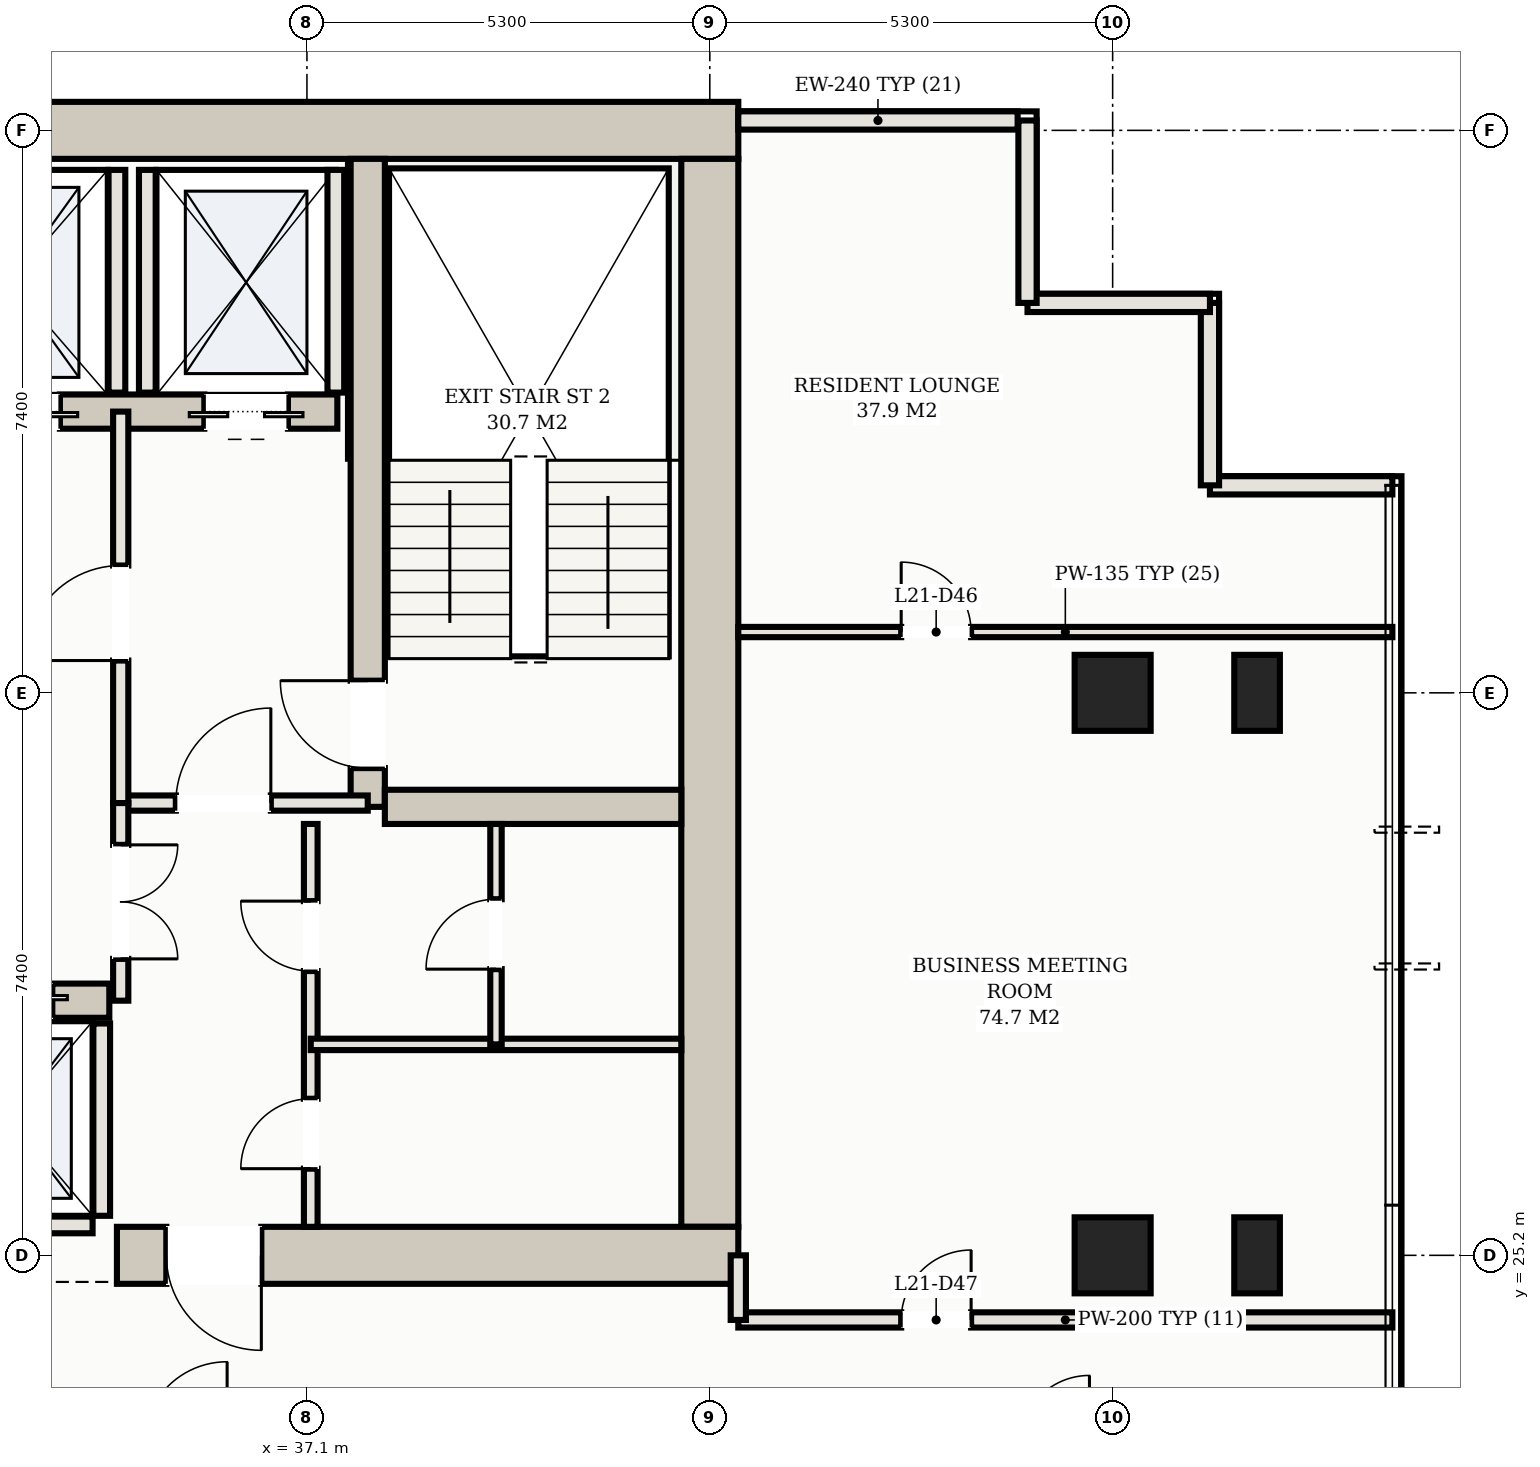
"""IFC4 building model, lengths in metres.
Left out: names, types, materials, properties, quantities, classifications, styles, units other than length and angle.
Written with IfcOpenShell. Run it as: python <this file> out.ifc"""

import sys

from ifc_helpers import new_model, si_unit, direction, frame, frame_2d, origin, origin_2d, place, context, subcontext, project, spatial, rectangle, hollow_rectangle, extrude, element, fill, save


model = new_model("IFC4")
c1 = context("Model", 3, precision=1e-05, world=origin(), true_north=direction((0.0, 1.0)))
c2 = subcontext(c1, "Body", "Model", "MODEL_VIEW")
j1 = project(units=[si_unit("LENGTHUNIT", "METRE"), si_unit("PLANEANGLEUNIT", "RADIAN")], contexts=[c1])
p1 = place(None, origin())
s1 = spatial("IfcSite", under=j1, at=p1, CompositionType="ELEMENT")
p2 = place(p1, origin())
s2 = spatial("IfcBuilding", under=s1, at=p2, CompositionType="ELEMENT")
p3 = place(p2, frame((0.0, 0.0, 81.7)))
s3 = spatial("IfcBuildingStorey", under=s2, at=p3, CompositionType="ELEMENT", Elevation=81.7)
p4 = place(p3, frame((10.225, 40.0, 0.0), z_axis=(0.0, 0.0, 1.0), x_axis=(1.0, 0.0, 0.0)))
e1 = element("IfcWall", 1, at=p4, inside=s3, PredefinedType="SHEAR", context=c2, shape_type="SweptSolid", body=[
    extrude(rectangle(XDim=32.55, YDim=0.75, at=frame_2d((16.275, 0.0))), origin(), (0.0, 0.0, 1.0), 3.09),
])
p5 = place(p3, frame((42.4, 25.575, 0.0), z_axis=(0.0, 0.0, 1.0), x_axis=(0.0, 1.0, 0.0)))
e2 = element("IfcWall", 2, at=p5, inside=s3, PredefinedType="SHEAR", context=c2, shape_type="SweptSolid", body=[
    extrude(rectangle(XDim=14.05, YDim=0.75, at=frame_2d((7.025, 0.0))), origin(), (0.0, 0.0, 1.0), 3.09),
])
p6 = place(p3, frame((34.6, 25.2, 0.0), z_axis=(0.0, 0.0, 1.0), x_axis=(1.0, 0.0, 0.0)))
e3 = element("IfcWall", 3, at=p6, inside=s3, PredefinedType="SHEAR", context=c2, shape_type="SweptSolid", body=[
    extrude(rectangle(XDim=8.175, YDim=0.75, at=frame_2d((4.087, 0.0))), origin(), (0.0, 0.0, 1.0), 3.09),
])
p7 = place(p6, frame((0.65, 0.0, 0.0)))
e4 = element("IfcOpeningElement", 4, at=p7, cuts=e3, PredefinedType="OPENING", context=c2, shape_type="SweptSolid", body=[
    extrude(rectangle(XDim=1.25, YDim=2.2, at=frame_2d((0.625, 1.1))), frame((0.0, 0.385, 0.0), z_axis=(0.0, -1.0, 0.0), x_axis=(1.0, 0.0, 0.0)), (0.0, 0.0, 1.0), 0.77),
])
p8 = place(p3, frame((37.9, 31.1, 0.0), z_axis=(0.0, 0.0, 1.0), x_axis=(0.0, 1.0, 0.0)))
e5 = element("IfcWall", 5, at=p8, inside=s3, PredefinedType="SHEAR", context=c2, shape_type="SweptSolid", body=[
    extrude(rectangle(XDim=8.525, YDim=0.45, at=frame_2d((4.262, 0.0))), origin(), (0.0, 0.0, 1.0), 3.09),
])
p9 = place(p8, frame((0.51, 0.0, 0.0)))
e6 = element("IfcOpeningElement", 6, at=p9, cuts=e5, PredefinedType="OPENING", context=c2, shape_type="SweptSolid", body=[
    extrude(rectangle(XDim=1.15, YDim=2.2, at=frame_2d((0.575, 1.1))), frame((0.0, 0.235, 0.0), z_axis=(0.0, -1.0, 0.0), x_axis=(1.0, 0.0, 0.0)), (0.0, 0.0, 1.0), 0.47),
])
p10 = place(p3, frame((38.125, 31.1, 0.0), z_axis=(0.0, 0.0, 1.0), x_axis=(1.0, 0.0, 0.0)))
e7 = element("IfcWall", 7, at=p10, inside=s3, PredefinedType="SHEAR", context=c2, shape_type="SweptSolid", body=[
    extrude(rectangle(XDim=3.9, YDim=0.45, at=frame_2d((1.95, 0.0))), origin(), (0.0, 0.0, 1.0), 3.09),
])
p11 = place(p3, frame((15.5, 36.3, 0.0), z_axis=(0.0, 0.0, 1.0), x_axis=(1.0, 0.0, 0.0)))
e8 = element("IfcWall", 8, at=p11, inside=s3, PredefinedType="SHEAR", context=c2, shape_type="SweptSolid", body=[
    extrude(rectangle(XDim=22.0, YDim=0.45, at=frame_2d((11.0, 0.0))), origin(), (0.0, 0.0, 1.0), 3.09),
])
p12 = place(p11, frame((0.65, 0.0, 0.0)))
e9 = element("IfcOpeningElement", 9, at=p12, cuts=e8, PredefinedType="OPENING", context=c2, shape_type="SweptSolid", body=[
    extrude(rectangle(XDim=1.1, YDim=2.15, at=frame_2d((0.55, 1.075))), frame((0.0, 0.235, 0.0), z_axis=(0.0, -1.0, 0.0), x_axis=(1.0, 0.0, 0.0)), (0.0, 0.0, 1.0), 0.47),
])
p13 = place(p11, frame((20.25, 0.0, 0.0)))
e10 = element("IfcOpeningElement", 10, at=p13, cuts=e8, PredefinedType="OPENING", context=c2, shape_type="SweptSolid", body=[
    extrude(rectangle(XDim=1.1, YDim=2.15, at=frame_2d((0.55, 1.075))), frame((0.0, 0.235, 0.0), z_axis=(0.0, -1.0, 0.0), x_axis=(1.0, 0.0, 0.0)), (0.0, 0.0, 1.0), 0.47),
])
p14 = place(p11, frame((17.05, 0.0, 0.0)))
e11 = element("IfcOpeningElement", 11, at=p14, cuts=e8, PredefinedType="OPENING", context=c2, shape_type="SweptSolid", body=[
    extrude(rectangle(XDim=1.3, YDim=2.2, at=frame_2d((0.65, 1.1))), frame((0.0, 0.235, 0.0), z_axis=(0.0, -1.0, 0.0), x_axis=(1.0, 0.0, 0.0)), (0.0, 0.0, 1.0), 0.47),
])
p15 = place(p3, frame((18.5, 28.55, 0.0), z_axis=(0.0, 0.0, 1.0), x_axis=(1.0, 0.0, 0.0)))
e12 = element("IfcWall", 12, at=p15, inside=s3, PredefinedType="SHEAR", context=c2, shape_type="SweptSolid", body=[
    extrude(rectangle(XDim=16.0, YDim=0.45, at=frame_2d((8.0, 0.0))), origin(), (0.0, 0.0, 1.0), 3.09),
])
p16 = place(p15, frame((8.95, 0.0, 0.0)))
e13 = element("IfcOpeningElement", 13, at=p16, cuts=e12, PredefinedType="OPENING", context=c2, shape_type="SweptSolid", body=[
    extrude(rectangle(XDim=1.1, YDim=2.15, at=frame_2d((0.55, 1.075))), frame((0.0, 0.235, 0.0), z_axis=(0.0, -1.0, 0.0), x_axis=(1.0, 0.0, 0.0)), (0.0, 0.0, 1.0), 0.47),
])
p17 = place(p15, frame((11.55, 0.0, 0.0)))
e14 = element("IfcOpeningElement", 14, at=p17, cuts=e12, PredefinedType="OPENING", context=c2, shape_type="SweptSolid", body=[
    extrude(rectangle(XDim=1.1, YDim=2.15, at=frame_2d((0.55, 1.075))), frame((0.0, 0.235, 0.0), z_axis=(0.0, -1.0, 0.0), x_axis=(1.0, 0.0, 0.0)), (0.0, 0.0, 1.0), 0.47),
])
p18 = place(p15, frame((14.15, 0.0, 0.0)))
e15 = element("IfcOpeningElement", 15, at=p18, cuts=e12, PredefinedType="OPENING", context=c2, shape_type="SweptSolid", body=[
    extrude(rectangle(XDim=1.1, YDim=2.15, at=frame_2d((0.55, 1.075))), frame((0.0, 0.235, 0.0), z_axis=(0.0, -1.0, 0.0), x_axis=(1.0, 0.0, 0.0)), (0.0, 0.0, 1.0), 0.47),
])
for number, where, z_axis, x_axis in (
    (16, (47.7, 25.2, 0.0), (0.0, 0.0, 1.0), (1.0, 0.0, 0.0)),
    (17, (47.7, 32.6, 0.0), (0.0, 0.0, 1.0), (1.0, 0.0, 0.0)),
):
    element("IfcColumn", number, at=place(p3, frame(where, z_axis=z_axis, x_axis=x_axis)), inside=s3, PredefinedType="COLUMN", context=c2, shape_type="SweptSolid", body=[
        extrude(hollow_rectangle(XDim=1.0, YDim=1.0, WallThickness=0.036, at=origin_2d()), origin(), (0.0, 0.0, 1.0), 3.3),
    ])
for number, where, z_axis, x_axis in (
    (18, (49.6, 25.2, 0.0), (0.0, 0.0, 1.0), (1.0, 0.0, 0.0)),
    (19, (49.6, 32.6, 0.0), (0.0, 0.0, 1.0), (1.0, 0.0, 0.0)),
):
    element("IfcColumn", number, at=place(p3, frame(where, z_axis=z_axis, x_axis=x_axis)), inside=s3, PredefinedType="COLUMN", context=c2, shape_type="SweptSolid", body=[
        extrude(hollow_rectangle(XDim=0.6, YDim=1.0, WallThickness=0.032, at=origin_2d()), origin(), (0.0, 0.0, 1.0), 3.3),
    ])
for number, where, z_axis, x_axis in (
    (20, (35.0, 36.55, 0.0), (0.0, 0.0, 1.0), (0.0, 1.0, 0.0)),
    (21, (37.48, 36.55, 0.0), (0.0, 0.0, 1.0), (0.0, 1.0, 0.0)),
    (22, (34.6, 36.55, 0.0), (0.0, 0.0, 1.0), (0.0, 1.0, 0.0)),
):
    element("IfcWall", number, at=place(p3, frame(where, z_axis=z_axis, x_axis=x_axis)), inside=s3, PredefinedType="SOLIDWALL", context=c2, shape_type="SweptSolid", body=[
        extrude(rectangle(XDim=2.93, YDim=0.22, at=frame_2d((1.465, 0.0))), origin(), (0.0, 0.0, 1.0), 3.09),
    ])
p19 = place(p3, frame((34.4, 25.72, 0.0), z_axis=(0.0, 0.0, 1.0), x_axis=(0.0, 1.0, 0.0)))
e23 = element("IfcWall", 23, at=p19, inside=s3, PredefinedType="SOLIDWALL", context=c2, shape_type="SweptSolid", body=[
    extrude(rectangle(XDim=2.53, YDim=0.22, at=frame_2d((1.265, 0.0))), origin(), (0.0, 0.0, 1.0), 3.09),
])
p20 = place(p3, frame((32.12, 25.6, 0.0), z_axis=(0.0, 0.0, 1.0), x_axis=(1.0, 0.0, 0.0)))
e24 = element("IfcWall", 24, at=p20, inside=s3, PredefinedType="SOLIDWALL", context=c2, shape_type="SweptSolid", body=[
    extrude(rectangle(XDim=2.16, YDim=0.22, at=frame_2d((1.08, 0.0))), origin(), (0.0, 0.0, 1.0), 3.09),
])
for number, where, z_axis, x_axis in (
    (25, (51.38, 35.33, 0.0), (0.0, 0.0, 1.0), (-1.0, 0.0, 0.0)),
    (26, (48.98, 35.33, 0.0), (0.0, 0.0, 1.0), (0.0, 1.0, 0.0)),
    (27, (48.98, 37.73, 0.0), (0.0, 0.0, 1.0), (-1.0, 0.0, 0.0)),
    (28, (46.58, 37.73, 0.0), (0.0, 0.0, 1.0), (0.0, 1.0, 0.0)),
):
    element("IfcWall", number, at=place(p3, frame(where, z_axis=z_axis, x_axis=x_axis)), inside=s3, PredefinedType="SOLIDWALL", context=c2, shape_type="SweptSolid", body=[
        extrude(rectangle(XDim=2.4, YDim=0.24, at=frame_2d((1.2, 0.0))), origin(), (0.0, 0.0, 1.0), 3.09),
    ])
p21 = place(p3, frame((46.45, 40.13, 0.0), z_axis=(0.0, 0.0, 1.0), x_axis=(-1.0, 0.0, 0.0)))
e29 = element("IfcWall", 29, at=p21, inside=s3, PredefinedType="SOLIDWALL", context=c2, shape_type="SweptSolid", body=[
    extrude(rectangle(XDim=3.675, YDim=0.24, at=frame_2d((1.837, 0.0))), origin(), (0.0, 0.0, 1.0), 3.09),
])
p22 = place(p3, frame((34.65, 31.15, 0.0), z_axis=(0.0, 0.0, 1.0), x_axis=(1.0, 0.0, 0.0)))
e30 = element("IfcWall", 30, at=p22, inside=s3, PredefinedType="PARTITIONING", context=c2, shape_type="SweptSolid", body=[
    extrude(rectangle(XDim=3.25, YDim=0.2, at=frame_2d((1.625, 0.0))), origin(), (0.0, 0.0, 1.0), 2.38),
])
p23 = place(p22, frame((0.725, 0.0, 0.0)))
e31 = element("IfcOpeningElement", 31, at=p23, cuts=e30, PredefinedType="OPENING", context=c2, shape_type="SweptSolid", body=[
    extrude(rectangle(XDim=1.25, YDim=2.2, at=frame_2d((0.625, 1.1))), frame((0.0, 0.11, 0.0), z_axis=(0.0, -1.0, 0.0), x_axis=(1.0, 0.0, 0.0)), (0.0, 0.0, 1.0), 0.22),
])
p24 = place(p3, frame((34.65, 31.15, 0.0), z_axis=(0.0, 0.0, 1.0), x_axis=(0.0, 1.0, 0.0)))
e32 = element("IfcWall", 32, at=p24, inside=s3, PredefinedType="PARTITIONING", context=c2, shape_type="SweptSolid", body=[
    extrude(rectangle(XDim=5.15, YDim=0.2, at=frame_2d((2.575, 0.0))), origin(), (0.0, 0.0, 1.0), 2.38),
])
p25 = place(p24, frame((1.875, 0.0, 0.0)))
e33 = element("IfcOpeningElement", 33, at=p25, cuts=e32, PredefinedType="OPENING", context=c2, shape_type="SweptSolid", body=[
    extrude(rectangle(XDim=1.25, YDim=2.2, at=frame_2d((0.625, 1.1))), frame((0.0, 0.11, 0.0), z_axis=(0.0, -1.0, 0.0), x_axis=(1.0, 0.0, 0.0)), (0.0, 0.0, 1.0), 0.22),
])
p26 = place(p3, frame((37.15, 25.575, 0.0), z_axis=(0.0, 0.0, 1.0), x_axis=(0.0, 1.0, 0.0)))
e34 = element("IfcWall", 34, at=p26, inside=s3, PredefinedType="PARTITIONING", context=c2, shape_type="SweptSolid", body=[
    extrude(rectangle(XDim=5.3, YDim=0.18, at=frame_2d((2.65, 0.0))), origin(), (0.0, 0.0, 1.0), 2.38),
])
p27 = place(p26, frame((0.765, 0.0, 0.0)))
e35 = element("IfcOpeningElement", 35, at=p27, cuts=e34, PredefinedType="OPENING", context=c2, shape_type="SweptSolid", body=[
    extrude(rectangle(XDim=0.92, YDim=2.15, at=frame_2d((0.46, 1.075))), frame((0.0, 0.1, 0.0), z_axis=(0.0, -1.0, 0.0), x_axis=(1.0, 0.0, 0.0)), (0.0, 0.0, 1.0), 0.2),
])
p28 = place(p26, frame((3.365, 0.0, 0.0)))
e36 = element("IfcOpeningElement", 36, at=p28, cuts=e34, PredefinedType="OPENING", context=c2, shape_type="SweptSolid", body=[
    extrude(rectangle(XDim=0.92, YDim=2.15, at=frame_2d((0.46, 1.075))), frame((0.0, 0.1, 0.0), z_axis=(0.0, -1.0, 0.0), x_axis=(1.0, 0.0, 0.0)), (0.0, 0.0, 1.0), 0.2),
])
p29 = place(p3, frame((37.15, 27.975, 0.0), z_axis=(0.0, 0.0, 1.0), x_axis=(1.0, 0.0, 0.0)))
e37 = element("IfcWall", 37, at=p29, inside=s3, PredefinedType="PARTITIONING", context=c2, shape_type="SweptSolid", body=[
    extrude(rectangle(XDim=4.875, YDim=0.15, at=frame_2d((2.438, 0.0))), origin(), (0.0, 0.0, 1.0), 2.38),
])
p30 = place(p3, frame((39.587, 27.975, 0.0), z_axis=(0.0, 0.0, 1.0), x_axis=(0.0, 1.0, 0.0)))
e38 = element("IfcWall", 38, at=p30, inside=s3, PredefinedType="PARTITIONING", context=c2, shape_type="SweptSolid", body=[
    extrude(rectangle(XDim=2.9, YDim=0.15, at=frame_2d((1.45, 0.0))), origin(), (0.0, 0.0, 1.0), 2.38),
])
p31 = place(p30, frame((0.99, 0.0, 0.0)))
e39 = element("IfcOpeningElement", 39, at=p31, cuts=e38, PredefinedType="OPENING", context=c2, shape_type="SweptSolid", body=[
    extrude(rectangle(XDim=0.92, YDim=2.15, at=frame_2d((0.46, 1.075))), frame((0.0, 0.085, 0.0), z_axis=(0.0, -1.0, 0.0), x_axis=(1.0, 0.0, 0.0)), (0.0, 0.0, 1.0), 0.17),
])
p32 = place(p3, frame((34.65, 28.55, 0.0), z_axis=(0.0, 0.0, 1.0), x_axis=(0.0, 1.0, 0.0)))
e40 = element("IfcWall", 40, at=p32, inside=s3, PredefinedType="PARTITIONING", context=c2, shape_type="SweptSolid", body=[
    extrude(rectangle(XDim=2.6, YDim=0.2, at=frame_2d((1.3, 0.0))), origin(), (0.0, 0.0, 1.0), 2.38),
])
p33 = place(p32, frame((0.55, 0.0, 0.0)))
e41 = element("IfcOpeningElement", 41, at=p33, cuts=e40, PredefinedType="OPENING", context=c2, shape_type="SweptSolid", body=[
    extrude(rectangle(XDim=1.5, YDim=2.25, at=frame_2d((0.75, 1.125))), frame((0.0, 0.11, 0.0), z_axis=(0.0, -1.0, 0.0), x_axis=(1.0, 0.0, 0.0)), (0.0, 0.0, 1.0), 0.22),
])
p34 = place(p3, frame((42.775, 24.35, 0.0), z_axis=(0.0, 0.0, 1.0), x_axis=(1.0, 0.0, 0.0)))
e42 = element("IfcWall", 42, at=p34, inside=s3, PredefinedType="PARTITIONING", context=c2, shape_type="SweptSolid", body=[
    extrude(rectangle(XDim=8.605, YDim=0.2, at=frame_2d((4.302, 0.0))), origin(), (0.0, 0.0, 1.0), 2.38),
])
p35 = place(p34, frame((2.143, 0.0, 0.0)))
e43 = element("IfcOpeningElement", 43, at=p35, cuts=e42, PredefinedType="OPENING", context=c2, shape_type="SweptSolid", body=[
    extrude(rectangle(XDim=0.92, YDim=2.15, at=frame_2d((0.46, 1.075))), frame((0.0, 0.11, 0.0), z_axis=(0.0, -1.0, 0.0), x_axis=(1.0, 0.0, 0.0)), (0.0, 0.0, 1.0), 0.22),
])
p36 = place(p3, frame((42.775, 24.35, 0.0), z_axis=(0.0, 0.0, 1.0), x_axis=(0.0, 1.0, 0.0)))
e44 = element("IfcWall", 44, at=p36, inside=s3, PredefinedType="PARTITIONING", context=c2, shape_type="SweptSolid", body=[
    extrude(rectangle(XDim=0.85, YDim=0.2, at=frame_2d((0.425, 0.0))), origin(), (0.0, 0.0, 1.0), 2.38),
])
p37 = place(p3, frame((42.775, 33.4, 0.0), z_axis=(0.0, 0.0, 1.0), x_axis=(1.0, 0.0, 0.0)))
e45 = element("IfcWall", 45, at=p37, inside=s3, PredefinedType="PARTITIONING", context=c2, shape_type="SweptSolid", body=[
    extrude(rectangle(XDim=8.605, YDim=0.135, at=frame_2d((4.302, 0.0))), origin(), (0.0, 0.0, 1.0), 2.38),
])
p38 = place(p37, frame((2.143, 0.0, 0.0)))
e46 = element("IfcOpeningElement", 46, at=p38, cuts=e45, PredefinedType="OPENING", context=c2, shape_type="SweptSolid", body=[
    extrude(rectangle(XDim=0.92, YDim=2.15, at=frame_2d((0.46, 1.075))), frame((0.0, 0.078, 0.0), z_axis=(0.0, -1.0, 0.0), x_axis=(1.0, 0.0, 0.0)), (0.0, 0.0, 1.0), 0.155),
])
p39 = place(p13, frame((1.1, 0.0, 0.0), z_axis=(0.0, 0.0, 1.0), x_axis=(-1.0, 0.0, 0.0)))
e47 = element("IfcDoor", 47, at=p39, inside=s3, OperationType="DOUBLE_DOOR_SLIDING", PredefinedType="DOOR", context=c2, shape_type="SweptSolid", body=[
    extrude(rectangle(XDim=1.1, YDim=2.15, at=frame_2d((0.55, 1.075))), frame((0.0, 0.025, 0.0), z_axis=(0.0, -1.0, 0.0), x_axis=(1.0, 0.0, 0.0)), (0.0, 0.0, 1.0), 0.05),
])
fill(e10, e47)
p40 = place(p14, frame((1.3, 0.0, 0.0), z_axis=(0.0, 0.0, 1.0), x_axis=(-1.0, 0.0, 0.0)))
e48 = element("IfcDoor", 48, at=p40, inside=s3, OperationType="DOUBLE_DOOR_SLIDING", PredefinedType="DOOR", context=c2, shape_type="SweptSolid", body=[
    extrude(rectangle(XDim=1.3, YDim=2.2, at=frame_2d((0.65, 1.1))), frame((0.0, 0.025, 0.0), z_axis=(0.0, -1.0, 0.0), x_axis=(1.0, 0.0, 0.0)), (0.0, 0.0, 1.0), 0.05),
])
fill(e11, e48)
p41 = place(p7, frame((1.25, 0.0, 0.0), z_axis=(0.0, 0.0, 1.0), x_axis=(-1.0, 0.0, 0.0)))
e49 = element("IfcDoor", 49, at=p41, inside=s3, OperationType="SINGLE_SWING_LEFT", PredefinedType="DOOR", context=c2, shape_type="SweptSolid", body=[
    extrude(rectangle(XDim=1.25, YDim=2.2, at=frame_2d((0.625, 1.1))), frame((0.0, 0.025, 0.0), z_axis=(0.0, -1.0, 0.0), x_axis=(1.0, 0.0, 0.0)), (0.0, 0.0, 1.0), 0.05),
])
fill(e4, e49)
p42 = place(p23, origin())
e50 = element("IfcDoor", 50, at=p42, inside=s3, OperationType="SINGLE_SWING_RIGHT", PredefinedType="DOOR", context=c2, shape_type="SweptSolid", body=[
    extrude(rectangle(XDim=1.25, YDim=2.2, at=frame_2d((0.625, 1.1))), frame((0.0, 0.025, 0.0), z_axis=(0.0, -1.0, 0.0), x_axis=(1.0, 0.0, 0.0)), (0.0, 0.0, 1.0), 0.05),
])
fill(e31, e50)
p43 = place(p25, origin())
e51 = element("IfcDoor", 51, at=p43, inside=s3, OperationType="SINGLE_SWING_LEFT", PredefinedType="DOOR", context=c2, shape_type="SweptSolid", body=[
    extrude(rectangle(XDim=1.25, YDim=2.2, at=frame_2d((0.625, 1.1))), frame((0.0, 0.025, 0.0), z_axis=(0.0, -1.0, 0.0), x_axis=(1.0, 0.0, 0.0)), (0.0, 0.0, 1.0), 0.05),
])
fill(e33, e51)
p44 = place(p9, origin())
e52 = element("IfcDoor", 52, at=p44, inside=s3, OperationType="SINGLE_SWING_RIGHT", PredefinedType="DOOR", context=c2, shape_type="SweptSolid", body=[
    extrude(rectangle(XDim=1.15, YDim=2.2, at=frame_2d((0.575, 1.1))), frame((0.0, 0.025, 0.0), z_axis=(0.0, -1.0, 0.0), x_axis=(1.0, 0.0, 0.0)), (0.0, 0.0, 1.0), 0.05),
])
fill(e6, e52)
p45 = place(p27, origin())
e53 = element("IfcDoor", 53, at=p45, inside=s3, OperationType="SINGLE_SWING_LEFT", PredefinedType="DOOR", context=c2, shape_type="SweptSolid", body=[
    extrude(rectangle(XDim=0.92, YDim=2.15, at=frame_2d((0.46, 1.075))), frame((0.0, 0.025, 0.0), z_axis=(0.0, -1.0, 0.0), x_axis=(1.0, 0.0, 0.0)), (0.0, 0.0, 1.0), 0.05),
])
fill(e35, e53)
p46 = place(p28, origin())
e54 = element("IfcDoor", 54, at=p46, inside=s3, OperationType="SINGLE_SWING_RIGHT", PredefinedType="DOOR", context=c2, shape_type="SweptSolid", body=[
    extrude(rectangle(XDim=0.92, YDim=2.15, at=frame_2d((0.46, 1.075))), frame((0.0, 0.025, 0.0), z_axis=(0.0, -1.0, 0.0), x_axis=(1.0, 0.0, 0.0)), (0.0, 0.0, 1.0), 0.05),
])
fill(e36, e54)
p47 = place(p31, origin())
e55 = element("IfcDoor", 55, at=p47, inside=s3, OperationType="SINGLE_SWING_LEFT", PredefinedType="DOOR", context=c2, shape_type="SweptSolid", body=[
    extrude(rectangle(XDim=0.92, YDim=2.15, at=frame_2d((0.46, 1.075))), frame((0.0, 0.025, 0.0), z_axis=(0.0, -1.0, 0.0), x_axis=(1.0, 0.0, 0.0)), (0.0, 0.0, 1.0), 0.05),
])
fill(e39, e55)
p48 = place(p33, frame((1.5, 0.0, 0.0), z_axis=(0.0, 0.0, 1.0), x_axis=(-1.0, 0.0, 0.0)))
e56 = element("IfcDoor", 56, at=p48, inside=s3, OperationType="DOUBLE_DOOR_SINGLE_SWING", PredefinedType="DOOR", context=c2, shape_type="SweptSolid", body=[
    extrude(rectangle(XDim=1.5, YDim=2.25, at=frame_2d((0.75, 1.125))), frame((0.0, 0.025, 0.0), z_axis=(0.0, -1.0, 0.0), x_axis=(1.0, 0.0, 0.0)), (0.0, 0.0, 1.0), 0.05),
])
fill(e41, e56)
p49 = place(p38, origin())
e57 = element("IfcDoor", 57, at=p49, inside=s3, OperationType="SINGLE_SWING_LEFT", PredefinedType="DOOR", context=c2, shape_type="SweptSolid", body=[
    extrude(rectangle(XDim=0.92, YDim=2.15, at=frame_2d((0.46, 1.075))), frame((0.0, 0.025, 0.0), z_axis=(0.0, -1.0, 0.0), x_axis=(1.0, 0.0, 0.0)), (0.0, 0.0, 1.0), 0.05),
])
fill(e46, e57)
p50 = place(p35, origin())
e58 = element("IfcDoor", 58, at=p50, inside=s3, OperationType="SINGLE_SWING_RIGHT", PredefinedType="DOOR", context=c2, shape_type="SweptSolid", body=[
    extrude(rectangle(XDim=0.92, YDim=2.15, at=frame_2d((0.46, 1.075))), frame((0.0, 0.025, 0.0), z_axis=(0.0, -1.0, 0.0), x_axis=(1.0, 0.0, 0.0)), (0.0, 0.0, 1.0), 0.05),
])
fill(e43, e58)
save(model, sys.argv[1])
